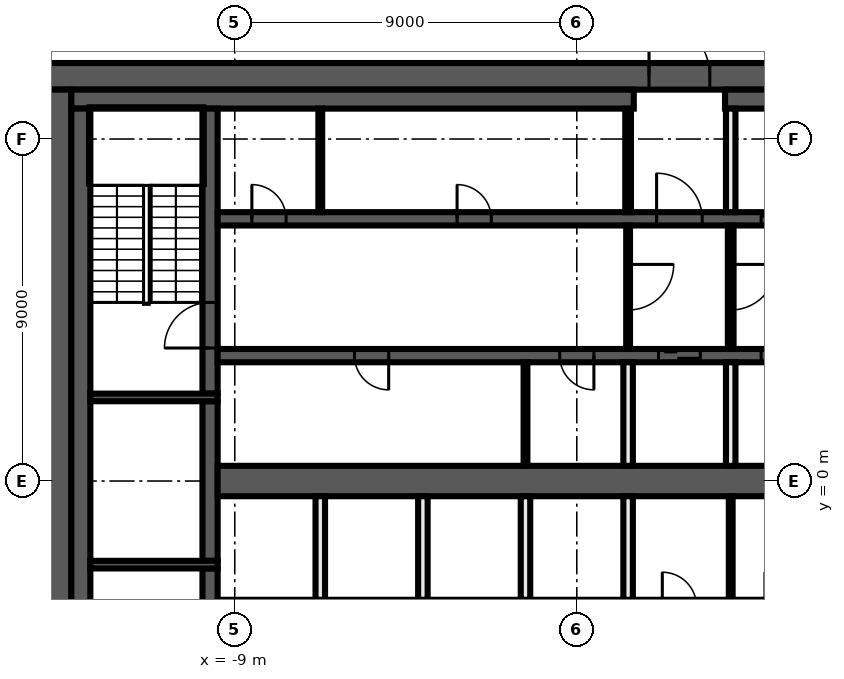
"""IFC4 building model, lengths in metres.
Left out: names, types, materials, properties, quantities, classifications, styles, units other than length and angle.
Written with IfcOpenShell. Run it as: python <this file> out.ifc"""

import sys

from ifc_helpers import new_model, si_unit, direction, frame, frame_2d, origin, place, context, subcontext, project, spatial, rectangle, extrude, element, fill, save


model = new_model("IFC4")
c1 = context("Model", 3, precision=1e-05, world=origin(), true_north=direction((0.0, 1.0)))
c2 = subcontext(c1, "Body", "Model", "MODEL_VIEW")
j1 = project(units=[si_unit("LENGTHUNIT", "METRE"), si_unit("PLANEANGLEUNIT", "RADIAN")], contexts=[c1])
p1 = place(None, origin())
s1 = spatial("IfcSite", under=j1, at=p1, CompositionType="ELEMENT")
p2 = place(p1, origin())
s2 = spatial("IfcBuilding", under=s1, at=p2, CompositionType="ELEMENT")
p3 = place(p2, frame((0.0, 0.0, 253.8)))
s3 = spatial("IfcBuildingStorey", under=s2, at=p3, CompositionType="ELEMENT", Elevation=253.8)
p4 = place(p3, frame((-14.0, 10.65, 0.0), z_axis=(0.0, 0.0, 1.0), x_axis=(1.0, 0.0, 0.0)))
e1 = element("IfcWall", 1, at=p4, inside=s3, PredefinedType="SHEAR", context=c2, shape_type="SweptSolid", body=[
    extrude(rectangle(XDim=28.0, YDim=0.7, at=frame_2d((14.0, 0.0))), origin(), (0.0, 0.0, 1.0), 3.82),
])
p5 = place(p4, frame((15.9, 0.0, 0.0)))
e2 = element("IfcOpeningElement", 2, at=p5, cuts=e1, PredefinedType="OPENING", context=c2, shape_type="SweptSolid", body=[
    extrude(rectangle(XDim=1.6, YDim=2.1, at=frame_2d((0.8, 1.05))), frame((0.0, 0.36, 0.0), z_axis=(0.0, -1.0, 0.0), x_axis=(1.0, 0.0, 0.0)), (0.0, 0.0, 1.0), 0.72),
])
p6 = place(p3, frame((-13.65, -10.3, 0.0), z_axis=(0.0, 0.0, 1.0), x_axis=(0.0, 1.0, 0.0)))
e3 = element("IfcWall", 3, at=p6, inside=s3, PredefinedType="SHEAR", context=c2, shape_type="SweptSolid", body=[
    extrude(rectangle(XDim=20.6, YDim=0.7, at=frame_2d((10.3, 0.0))), origin(), (0.0, 0.0, 1.0), 3.82),
])
p7 = place(p3, frame((-13.3, 10.05, 0.0), z_axis=(0.0, 0.0, 1.0), x_axis=(1.0, 0.0, 0.0)))
e4 = element("IfcWall", 4, at=p7, inside=s3, PredefinedType="SHEAR", context=c2, shape_type="SweptSolid", body=[
    extrude(rectangle(XDim=14.8, YDim=0.5, at=frame_2d((7.4, 0.0))), origin(), (0.0, 0.0, 1.0), 3.82),
])
p8 = place(p3, frame((3.9, 10.05, 0.0), z_axis=(0.0, 0.0, 1.0), x_axis=(1.0, 0.0, 0.0)))
e5 = element("IfcWall", 5, at=p8, inside=s3, PredefinedType="SHEAR", context=c2, shape_type="SweptSolid", body=[
    extrude(rectangle(XDim=9.4, YDim=0.5, at=frame_2d((4.7, 0.0))), origin(), (0.0, 0.0, 1.0), 3.82),
])
p9 = place(p3, frame((-13.05, -9.8, 0.0), z_axis=(0.0, 0.0, 1.0), x_axis=(0.0, 1.0, 0.0)))
e6 = element("IfcWall", 6, at=p9, inside=s3, PredefinedType="SHEAR", context=c2, shape_type="SweptSolid", body=[
    extrude(rectangle(XDim=19.6, YDim=0.5, at=frame_2d((9.8, 0.0))), origin(), (0.0, 0.0, 1.0), 3.82),
])
p10 = place(p3, frame((-9.65, -9.8, 0.0), z_axis=(0.0, 0.0, 1.0), x_axis=(0.0, 1.0, 0.0)))
e7 = element("IfcWall", 7, at=p10, inside=s3, PredefinedType="SHEAR", context=c2, shape_type="SweptSolid", body=[
    extrude(rectangle(XDim=7.5, YDim=0.4, at=frame_2d((3.75, 0.0))), origin(), (0.0, 0.0, 1.0), 3.82),
])
p11 = place(p10, frame((5.1, 0.0, 0.0)))
e8 = element("IfcOpeningElement", 8, at=p11, cuts=e7, PredefinedType="OPENING", context=c2, shape_type="SweptSolid", body=[
    extrude(rectangle(XDim=1.2, YDim=2.1, at=frame_2d((0.6, 1.05))), frame((0.0, 0.21, 0.0), z_axis=(0.0, -1.0, 0.0), x_axis=(1.0, 0.0, 0.0)), (0.0, 0.0, 1.0), 0.42),
])
p12 = place(p3, frame((-9.65, -2.1, 0.0), z_axis=(0.0, 0.0, 1.0), x_axis=(0.0, 1.0, 0.0)))
e9 = element("IfcWall", 9, at=p12, inside=s3, PredefinedType="SHEAR", context=c2, shape_type="SweptSolid", body=[
    extrude(rectangle(XDim=4.2, YDim=0.4, at=frame_2d((2.1, 0.0))), origin(), (0.0, 0.0, 1.0), 3.82),
])
p13 = place(p3, frame((-9.65, 2.3, 0.0), z_axis=(0.0, 0.0, 1.0), x_axis=(0.0, 1.0, 0.0)))
e10 = element("IfcWall", 10, at=p13, inside=s3, PredefinedType="SHEAR", context=c2, shape_type="SweptSolid", body=[
    extrude(rectangle(XDim=7.5, YDim=0.4, at=frame_2d((3.75, 0.0))), origin(), (0.0, 0.0, 1.0), 3.82),
])
p14 = place(p13, frame((1.2, 0.0, 0.0)))
e11 = element("IfcOpeningElement", 11, at=p14, cuts=e10, PredefinedType="OPENING", context=c2, shape_type="SweptSolid", body=[
    extrude(rectangle(XDim=1.2, YDim=2.1, at=frame_2d((0.6, 1.05))), frame((0.0, 0.21, 0.0), z_axis=(0.0, -1.0, 0.0), x_axis=(1.0, 0.0, 0.0)), (0.0, 0.0, 1.0), 0.42),
])
for number, where, z_axis, x_axis in (
    (12, (-9.45, 2.2, 0.0), (0.0, 0.0, 1.0), (-1.0, 0.0, 0.0)),
    (13, (-9.45, -2.2, 0.0), (0.0, 0.0, 1.0), (-1.0, 0.0, 0.0)),
):
    element("IfcWall", number, at=place(p3, frame(where, z_axis=z_axis, x_axis=x_axis)), inside=s3, PredefinedType="SHEAR", context=c2, shape_type="SweptSolid", body=[
        extrude(rectangle(XDim=3.35, YDim=0.2, at=frame_2d((1.675, 0.0))), origin(), (0.0, 0.0, 1.0), 3.82),
    ])
p15 = place(p3, frame((-9.45, 6.9, 0.0), z_axis=(0.0, 0.0, 1.0), x_axis=(1.0, 0.0, 0.0)))
e14 = element("IfcWall", 14, at=p15, inside=s3, PredefinedType="SHEAR", context=c2, shape_type="SweptSolid", body=[
    extrude(rectangle(XDim=18.9, YDim=0.35, at=frame_2d((9.45, 0.0))), origin(), (0.0, 0.0, 1.0), 3.82),
])
p16 = place(p15, frame((11.55, 0.0, 0.0)))
e15 = element("IfcOpeningElement", 15, at=p16, cuts=e14, PredefinedType="OPENING", context=c2, shape_type="SweptSolid", body=[
    extrude(rectangle(XDim=1.2, YDim=2.1, at=frame_2d((0.6, 1.05))), frame((0.0, 0.185, 0.0), z_axis=(0.0, -1.0, 0.0), x_axis=(1.0, 0.0, 0.0)), (0.0, 0.0, 1.0), 0.37),
])
p17 = place(p15, frame((14.3, 0.0, 0.0)))
e16 = element("IfcOpeningElement", 16, at=p17, cuts=e14, PredefinedType="OPENING", context=c2, shape_type="SweptSolid", body=[
    extrude(rectangle(XDim=1.1, YDim=2.1, at=frame_2d((0.55, 1.05))), frame((0.0, 0.185, 0.0), z_axis=(0.0, -1.0, 0.0), x_axis=(1.0, 0.0, 0.0)), (0.0, 0.0, 1.0), 0.37),
])
p18 = place(p15, frame((17.0, 0.0, 0.0)))
e17 = element("IfcOpeningElement", 17, at=p18, cuts=e14, PredefinedType="OPENING", context=c2, shape_type="SweptSolid", body=[
    extrude(rectangle(XDim=1.1, YDim=2.1, at=frame_2d((0.55, 1.05))), frame((0.0, 0.185, 0.0), z_axis=(0.0, -1.0, 0.0), x_axis=(1.0, 0.0, 0.0)), (0.0, 0.0, 1.0), 0.37),
])
p19 = place(p15, frame((0.9, 0.0, 0.0)))
e18 = element("IfcOpeningElement", 18, at=p19, cuts=e14, PredefinedType="OPENING", context=c2, shape_type="SweptSolid", body=[
    extrude(rectangle(XDim=0.9, YDim=2.1, at=frame_2d((0.45, 1.05))), frame((0.0, 0.185, 0.0), z_axis=(0.0, -1.0, 0.0), x_axis=(1.0, 0.0, 0.0)), (0.0, 0.0, 1.0), 0.37),
])
p20 = place(p15, frame((6.3, 0.0, 0.0)))
e19 = element("IfcOpeningElement", 19, at=p20, cuts=e14, PredefinedType="OPENING", context=c2, shape_type="SweptSolid", body=[
    extrude(rectangle(XDim=0.9, YDim=2.1, at=frame_2d((0.45, 1.05))), frame((0.0, 0.185, 0.0), z_axis=(0.0, -1.0, 0.0), x_axis=(1.0, 0.0, 0.0)), (0.0, 0.0, 1.0), 0.37),
])
p21 = place(p3, frame((9.45, 3.3, 0.0), z_axis=(0.0, 0.0, 1.0), x_axis=(-1.0, 0.0, 0.0)))
e20 = element("IfcWall", 20, at=p21, inside=s3, PredefinedType="SHEAR", context=c2, shape_type="SweptSolid", body=[
    extrude(rectangle(XDim=18.9, YDim=0.35, at=frame_2d((9.45, 0.0))), origin(), (0.0, 0.0, 1.0), 3.82),
])
p22 = place(p21, frame((6.2, 0.0, 0.0)))
e21 = element("IfcOpeningElement", 21, at=p22, cuts=e20, PredefinedType="OPENING", context=c2, shape_type="SweptSolid", body=[
    extrude(rectangle(XDim=1.1, YDim=2.1, at=frame_2d((0.55, 1.05))), frame((0.0, 0.185, 0.0), z_axis=(0.0, -1.0, 0.0), x_axis=(1.0, 0.0, 0.0)), (0.0, 0.0, 1.0), 0.37),
])
p23 = place(p21, frame((3.5, 0.0, 0.0)))
e22 = element("IfcOpeningElement", 22, at=p23, cuts=e20, PredefinedType="OPENING", context=c2, shape_type="SweptSolid", body=[
    extrude(rectangle(XDim=1.1, YDim=2.1, at=frame_2d((0.55, 1.05))), frame((0.0, 0.185, 0.0), z_axis=(0.0, -1.0, 0.0), x_axis=(1.0, 0.0, 0.0)), (0.0, 0.0, 1.0), 0.37),
])
p24 = place(p21, frame((0.9, 0.0, 0.0)))
e23 = element("IfcOpeningElement", 23, at=p24, cuts=e20, PredefinedType="OPENING", context=c2, shape_type="SweptSolid", body=[
    extrude(rectangle(XDim=0.9, YDim=2.1, at=frame_2d((0.45, 1.05))), frame((0.0, 0.185, 0.0), z_axis=(0.0, -1.0, 0.0), x_axis=(1.0, 0.0, 0.0)), (0.0, 0.0, 1.0), 0.37),
])
p25 = place(p21, frame((14.4, 0.0, 0.0)))
e24 = element("IfcOpeningElement", 24, at=p25, cuts=e20, PredefinedType="OPENING", context=c2, shape_type="SweptSolid", body=[
    extrude(rectangle(XDim=0.9, YDim=2.1, at=frame_2d((0.45, 1.05))), frame((0.0, 0.185, 0.0), z_axis=(0.0, -1.0, 0.0), x_axis=(1.0, 0.0, 0.0)), (0.0, 0.0, 1.0), 0.37),
])
p26 = place(p21, frame((9.0, 0.0, 0.0)))
e25 = element("IfcOpeningElement", 25, at=p26, cuts=e20, PredefinedType="OPENING", context=c2, shape_type="SweptSolid", body=[
    extrude(rectangle(XDim=0.9, YDim=2.1, at=frame_2d((0.45, 1.05))), frame((0.0, 0.185, 0.0), z_axis=(0.0, -1.0, 0.0), x_axis=(1.0, 0.0, 0.0)), (0.0, 0.0, 1.0), 0.37),
])
p27 = place(p3, frame((-9.45, 0.0, 0.0), z_axis=(0.0, 0.0, 1.0), x_axis=(1.0, 0.0, 0.0)))
e26 = element("IfcWall", 26, at=p27, inside=s3, PredefinedType="SHEAR", context=c2, shape_type="SweptSolid", body=[
    extrude(rectangle(XDim=18.9, YDim=0.8, at=frame_2d((9.45, 0.0))), origin(), (0.0, 0.0, 1.0), 3.82),
])
p28 = place(p3, frame((4.05, 6.725, 0.0), z_axis=(0.0, 0.0, 1.0), x_axis=(0.0, -1.0, 0.0)))
e27 = element("IfcWall", 27, at=p28, inside=s3, PredefinedType="PARTITIONING", context=c2, shape_type="SweptSolid", body=[
    extrude(rectangle(XDim=3.25, YDim=0.15, at=frame_2d((1.625, 0.0))), origin(), (0.0, 0.0, 1.0), 3.82),
])
p29 = place(p28, frame((1.025, 0.0, 0.0)))
e28 = element("IfcOpeningElement", 28, at=p29, cuts=e27, PredefinedType="OPENING", context=c2, shape_type="SweptSolid", body=[
    extrude(rectangle(XDim=1.2, YDim=2.1, at=frame_2d((0.6, 1.05))), frame((0.0, 0.085, 0.0), z_axis=(0.0, -1.0, 0.0), x_axis=(1.0, 0.0, 0.0)), (0.0, 0.0, 1.0), 0.17),
])
p30 = place(p3, frame((4.05, -3.125, 0.0), z_axis=(0.0, 0.0, 1.0), x_axis=(0.0, 1.0, 0.0)))
e29 = element("IfcWall", 29, at=p30, inside=s3, PredefinedType="PARTITIONING", context=c2, shape_type="SweptSolid", body=[
    extrude(rectangle(XDim=2.725, YDim=0.1, at=frame_2d((1.363, 0.0))), origin(), (0.0, 0.0, 1.0), 3.82),
])
for number, where, z_axis, x_axis in (
    (30, (4.05, 0.4, 0.0), (0.0, 0.0, 1.0), (0.0, 1.0, 0.0)),
    (31, (4.05, 7.075, 0.0), (0.0, 0.0, 1.0), (0.0, 1.0, 0.0)),
):
    element("IfcWall", number, at=place(p3, frame(where, z_axis=z_axis, x_axis=x_axis)), inside=s3, PredefinedType="SOLIDWALL", context=c2, shape_type="SweptSolid", body=[
        extrude(rectangle(XDim=2.725, YDim=0.25, at=frame_2d((1.363, 0.0))), origin(), (0.0, 0.0, 1.0), 3.82),
    ])
p31 = place(p3, frame((1.35, 7.075, 0.0), z_axis=(0.0, 0.0, 1.0), x_axis=(0.0, 1.0, 0.0)))
e32 = element("IfcWall", 32, at=p31, inside=s3, PredefinedType="PARTITIONING", context=c2, shape_type="SweptSolid", body=[
    extrude(rectangle(XDim=2.725, YDim=0.15, at=frame_2d((1.363, 0.0))), origin(), (0.0, 0.0, 1.0), 3.82),
])
p32 = place(p3, frame((1.35, 6.725, 0.0), z_axis=(0.0, 0.0, 1.0), x_axis=(0.0, -1.0, 0.0)))
e33 = element("IfcWall", 33, at=p32, inside=s3, PredefinedType="PARTITIONING", context=c2, shape_type="SweptSolid", body=[
    extrude(rectangle(XDim=3.25, YDim=0.1, at=frame_2d((1.625, 0.0))), origin(), (0.0, 0.0, 1.0), 3.82),
])
p33 = place(p32, frame((1.025, 0.0, 0.0)))
e34 = element("IfcOpeningElement", 34, at=p33, cuts=e33, PredefinedType="OPENING", context=c2, shape_type="SweptSolid", body=[
    extrude(rectangle(XDim=1.2, YDim=2.1, at=frame_2d((0.6, 1.05))), frame((0.0, 0.06, 0.0), z_axis=(0.0, -1.0, 0.0), x_axis=(1.0, 0.0, 0.0)), (0.0, 0.0, 1.0), 0.12),
])
for number, where, z_axis, x_axis in (
    (35, (1.35, -3.125, 0.0), (0.0, 0.0, 1.0), (0.0, 1.0, 0.0)),
    (36, (1.35, 0.4, 0.0), (0.0, 0.0, 1.0), (0.0, 1.0, 0.0)),
):
    element("IfcWall", number, at=place(p3, frame(where, z_axis=z_axis, x_axis=x_axis)), inside=s3, PredefinedType="SOLIDWALL", context=c2, shape_type="SweptSolid", body=[
        extrude(rectangle(XDim=2.725, YDim=0.25, at=frame_2d((1.363, 0.0))), origin(), (0.0, 0.0, 1.0), 3.82),
    ])
p34 = place(p3, frame((-1.35, 0.4, 0.0), z_axis=(0.0, 0.0, 1.0), x_axis=(0.0, 1.0, 0.0)))
e37 = element("IfcWall", 37, at=p34, inside=s3, PredefinedType="PARTITIONING", context=c2, shape_type="SweptSolid", body=[
    extrude(rectangle(XDim=2.725, YDim=0.1, at=frame_2d((1.363, 0.0))), origin(), (0.0, 0.0, 1.0), 3.82),
])
for number, where, z_axis, x_axis in (
    (38, (-1.35, -3.125, 0.0), (0.0, 0.0, 1.0), (0.0, 1.0, 0.0)),
    (39, (-4.05, -3.125, 0.0), (0.0, 0.0, 1.0), (0.0, 1.0, 0.0)),
):
    element("IfcWall", number, at=place(p3, frame(where, z_axis=z_axis, x_axis=x_axis)), inside=s3, PredefinedType="SOLIDWALL", context=c2, shape_type="SweptSolid", body=[
        extrude(rectangle(XDim=2.725, YDim=0.25, at=frame_2d((1.363, 0.0))), origin(), (0.0, 0.0, 1.0), 3.82),
    ])
p35 = place(p3, frame((-6.75, 7.075, 0.0), z_axis=(0.0, 0.0, 1.0), x_axis=(0.0, 1.0, 0.0)))
e40 = element("IfcWall", 40, at=p35, inside=s3, PredefinedType="PARTITIONING", context=c2, shape_type="SweptSolid", body=[
    extrude(rectangle(XDim=2.725, YDim=0.1, at=frame_2d((1.363, 0.0))), origin(), (0.0, 0.0, 1.0), 3.82),
])
p36 = place(p3, frame((-6.75, -3.125, 0.0), z_axis=(0.0, 0.0, 1.0), x_axis=(0.0, 1.0, 0.0)))
e41 = element("IfcWall", 41, at=p36, inside=s3, PredefinedType="SOLIDWALL", context=c2, shape_type="SweptSolid", body=[
    extrude(rectangle(XDim=2.725, YDim=0.25, at=frame_2d((1.363, 0.0))), origin(), (0.0, 0.0, 1.0), 3.82),
])
p37 = place(p5, origin())
e42 = element("IfcDoor", 42, at=p37, inside=s3, OperationType="DOUBLE_DOOR_SINGLE_SWING", PredefinedType="DOOR", context=c2, shape_type="SweptSolid", body=[
    extrude(rectangle(XDim=1.6, YDim=2.1, at=frame_2d((0.8, 1.05))), frame((0.0, 0.025, 0.0), z_axis=(0.0, -1.0, 0.0), x_axis=(1.0, 0.0, 0.0)), (0.0, 0.0, 1.0), 0.05),
])
fill(e2, e42)
p38 = place(p16, origin())
e43 = element("IfcDoor", 43, at=p38, inside=s3, OperationType="SINGLE_SWING_LEFT", PredefinedType="DOOR", context=c2, shape_type="SweptSolid", body=[
    extrude(rectangle(XDim=1.2, YDim=2.1, at=frame_2d((0.6, 1.05))), frame((0.0, 0.025, 0.0), z_axis=(0.0, -1.0, 0.0), x_axis=(1.0, 0.0, 0.0)), (0.0, 0.0, 1.0), 0.05),
])
fill(e15, e43)
p39 = place(p17, origin())
e44 = element("IfcDoor", 44, at=p39, inside=s3, OperationType="DOUBLE_DOOR_SLIDING", PredefinedType="DOOR", context=c2, shape_type="SweptSolid", body=[
    extrude(rectangle(XDim=1.1, YDim=2.1, at=frame_2d((0.55, 1.05))), frame((0.0, 0.025, 0.0), z_axis=(0.0, -1.0, 0.0), x_axis=(1.0, 0.0, 0.0)), (0.0, 0.0, 1.0), 0.05),
])
fill(e16, e44)
p40 = place(p22, origin())
e45 = element("IfcDoor", 45, at=p40, inside=s3, OperationType="DOUBLE_DOOR_SLIDING", PredefinedType="DOOR", context=c2, shape_type="SweptSolid", body=[
    extrude(rectangle(XDim=1.1, YDim=2.1, at=frame_2d((0.55, 1.05))), frame((0.0, 0.025, 0.0), z_axis=(0.0, -1.0, 0.0), x_axis=(1.0, 0.0, 0.0)), (0.0, 0.0, 1.0), 0.05),
])
fill(e21, e45)
p41 = place(p23, origin())
e46 = element("IfcDoor", 46, at=p41, inside=s3, OperationType="DOUBLE_DOOR_SLIDING", PredefinedType="DOOR", context=c2, shape_type="SweptSolid", body=[
    extrude(rectangle(XDim=1.1, YDim=2.1, at=frame_2d((0.55, 1.05))), frame((0.0, 0.025, 0.0), z_axis=(0.0, -1.0, 0.0), x_axis=(1.0, 0.0, 0.0)), (0.0, 0.0, 1.0), 0.05),
])
fill(e22, e46)
p42 = place(p19, origin())
e47 = element("IfcDoor", 47, at=p42, inside=s3, OperationType="SINGLE_SWING_RIGHT", PredefinedType="DOOR", context=c2, shape_type="SweptSolid", body=[
    extrude(rectangle(XDim=0.9, YDim=2.1, at=frame_2d((0.45, 1.05))), frame((0.0, 0.025, 0.0), z_axis=(0.0, -1.0, 0.0), x_axis=(1.0, 0.0, 0.0)), (0.0, 0.0, 1.0), 0.05),
])
fill(e18, e47)
p43 = place(p20, origin())
e48 = element("IfcDoor", 48, at=p43, inside=s3, OperationType="SINGLE_SWING_LEFT", PredefinedType="DOOR", context=c2, shape_type="SweptSolid", body=[
    extrude(rectangle(XDim=0.9, YDim=2.1, at=frame_2d((0.45, 1.05))), frame((0.0, 0.025, 0.0), z_axis=(0.0, -1.0, 0.0), x_axis=(1.0, 0.0, 0.0)), (0.0, 0.0, 1.0), 0.05),
])
fill(e19, e48)
p44 = place(p25, origin())
e49 = element("IfcDoor", 49, at=p44, inside=s3, OperationType="SINGLE_SWING_RIGHT", PredefinedType="DOOR", context=c2, shape_type="SweptSolid", body=[
    extrude(rectangle(XDim=0.9, YDim=2.1, at=frame_2d((0.45, 1.05))), frame((0.0, 0.025, 0.0), z_axis=(0.0, -1.0, 0.0), x_axis=(1.0, 0.0, 0.0)), (0.0, 0.0, 1.0), 0.05),
])
fill(e24, e49)
p45 = place(p26, origin())
e50 = element("IfcDoor", 50, at=p45, inside=s3, OperationType="SINGLE_SWING_LEFT", PredefinedType="DOOR", context=c2, shape_type="SweptSolid", body=[
    extrude(rectangle(XDim=0.9, YDim=2.1, at=frame_2d((0.45, 1.05))), frame((0.0, 0.025, 0.0), z_axis=(0.0, -1.0, 0.0), x_axis=(1.0, 0.0, 0.0)), (0.0, 0.0, 1.0), 0.05),
])
fill(e25, e50)
p46 = place(p14, origin())
e51 = element("IfcDoor", 51, at=p46, inside=s3, OperationType="SINGLE_SWING_RIGHT", PredefinedType="DOOR", context=c2, shape_type="SweptSolid", body=[
    extrude(rectangle(XDim=1.2, YDim=2.1, at=frame_2d((0.6, 1.05))), frame((0.0, 0.025, 0.0), z_axis=(0.0, -1.0, 0.0), x_axis=(1.0, 0.0, 0.0)), (0.0, 0.0, 1.0), 0.05),
])
fill(e11, e51)
p47 = place(p33, origin())
e52 = element("IfcDoor", 52, at=p47, inside=s3, OperationType="SINGLE_SWING_LEFT", PredefinedType="DOOR", context=c2, shape_type="SweptSolid", body=[
    extrude(rectangle(XDim=1.2, YDim=2.1, at=frame_2d((0.6, 1.05))), frame((0.0, 0.025, 0.0), z_axis=(0.0, -1.0, 0.0), x_axis=(1.0, 0.0, 0.0)), (0.0, 0.0, 1.0), 0.05),
])
fill(e34, e52)
p48 = place(p29, origin())
e53 = element("IfcDoor", 53, at=p48, inside=s3, OperationType="SINGLE_SWING_RIGHT", PredefinedType="DOOR", context=c2, shape_type="SweptSolid", body=[
    extrude(rectangle(XDim=1.2, YDim=2.1, at=frame_2d((0.6, 1.05))), frame((0.0, 0.025, 0.0), z_axis=(0.0, -1.0, 0.0), x_axis=(1.0, 0.0, 0.0)), (0.0, 0.0, 1.0), 0.05),
])
fill(e28, e53)
save(model, sys.argv[1])
